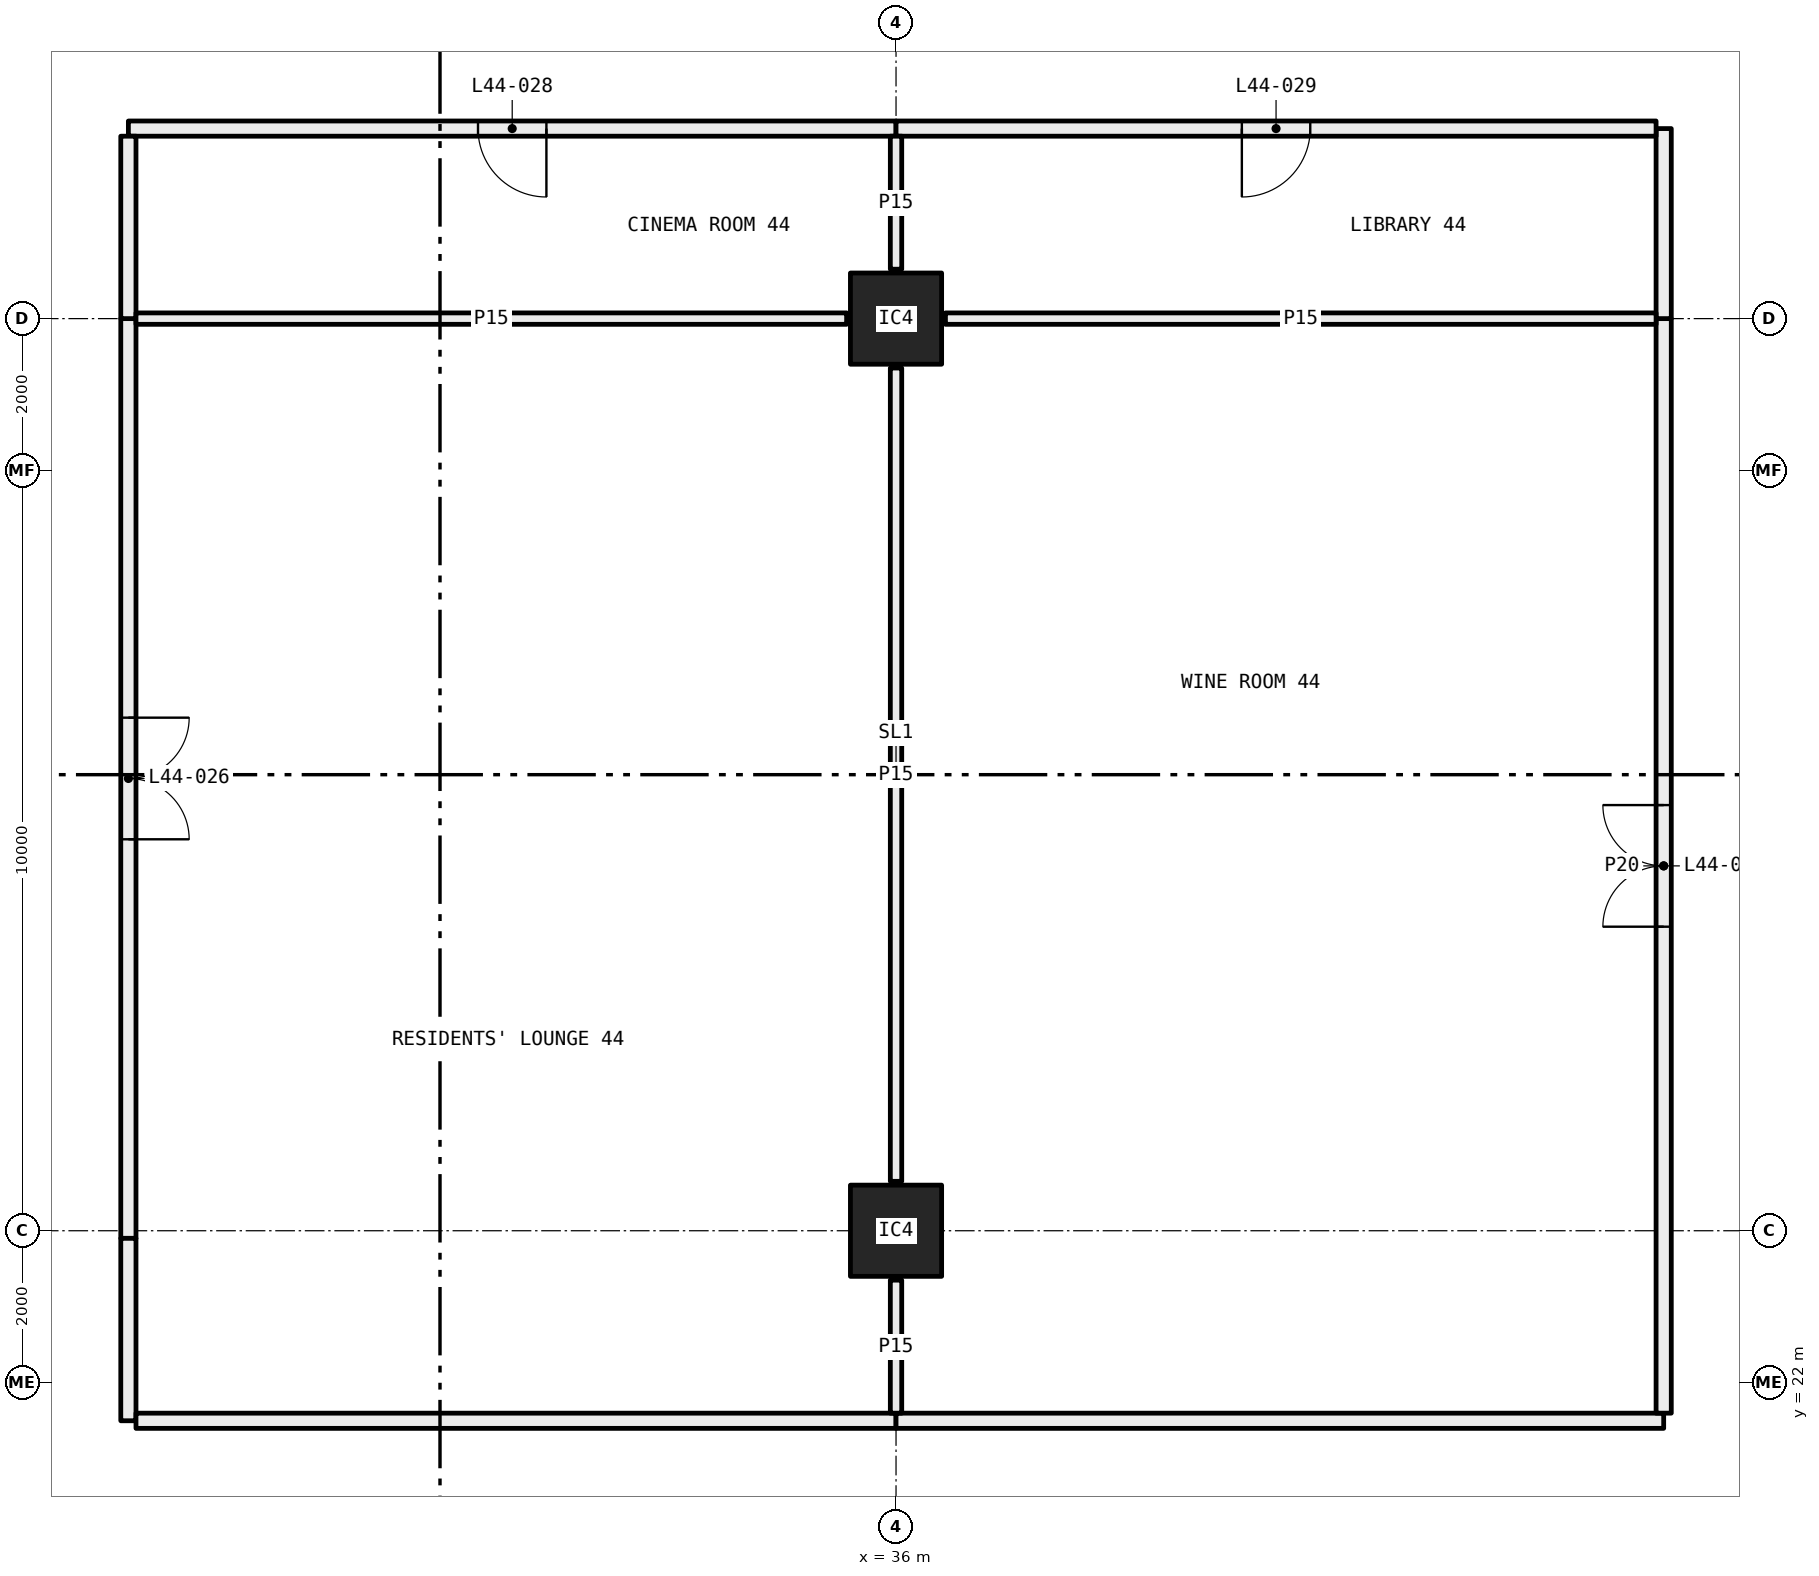
"""IFC4 building model, lengths in metres.
Left out: names, types, materials, properties, quantities, classifications, styles, units other than length and angle.
Written with IfcOpenShell. Run it as: python <this file> out.ifc"""

import sys

from ifc_helpers import new_model, si_unit, direction, frame, frame_2d, origin, origin_2d, place, context, subcontext, project, spatial, rectangle, hollow_rectangle, extrude, element, fill, save


model = new_model("IFC4")
c1 = context("Model", 3, precision=1e-05, world=origin(), true_north=direction((0.0, 1.0)))
c2 = subcontext(c1, "Body", "Model", "MODEL_VIEW")
j1 = project(units=[si_unit("LENGTHUNIT", "METRE"), si_unit("PLANEANGLEUNIT", "RADIAN")], contexts=[c1])
p1 = place(None, origin())
s1 = spatial("IfcSite", under=j1, at=p1, CompositionType="ELEMENT")
p2 = place(p1, origin())
s2 = spatial("IfcBuilding", under=s1, at=p2, CompositionType="ELEMENT")
p3 = place(p2, frame((0.0, 0.0, 168.6)))
s3 = spatial("IfcBuildingStorey", under=s2, at=p3, CompositionType="ELEMENT", Elevation=168.6)
for number, where, z_axis, x_axis in (
    (1, (36.0, 24.0, 0.0), (0.0, 0.0, 1.0), (1.0, 0.0, 0.0)),
    (2, (36.0, 36.0, 0.0), (0.0, 0.0, 1.0), (1.0, 0.0, 0.0)),
):
    element("IfcColumn", number, at=place(p3, frame(where, z_axis=z_axis, x_axis=x_axis)), inside=s3, PredefinedType="COLUMN", context=c2, shape_type="SweptSolid", body=[
        extrude(hollow_rectangle(XDim=1.2, YDim=1.2, WallThickness=0.05, at=origin_2d()), origin(), (0.0, 0.0, 1.0), 3.05),
    ])
p4 = place(p3, frame((25.9, 36.0, 0.0), z_axis=(0.0, 0.0, 1.0), x_axis=(0.0, -1.0, 0.0)))
e3 = element("IfcWall", 3, at=p4, inside=s3, PredefinedType="PARTITIONING", context=c2, shape_type="SweptSolid", body=[
    extrude(rectangle(XDim=12.1, YDim=0.2, at=frame_2d((6.05, 0.0))), origin(), (0.0, 0.0, 1.0), 2.45),
])
p5 = place(p4, frame((5.25, 0.0, 0.0)))
e4 = element("IfcOpeningElement", 4, at=p5, cuts=e3, PredefinedType="OPENING", context=c2, shape_type="SweptSolid", body=[
    extrude(rectangle(XDim=1.6, YDim=2.1, at=frame_2d((0.8, 1.05))), frame((0.0, 0.11, 0.0), z_axis=(0.0, -1.0, 0.0), x_axis=(1.0, 0.0, 0.0)), (0.0, 0.0, 1.0), 0.22),
])
p6 = place(p3, frame((25.9, 23.9, 0.0), z_axis=(0.0, 0.0, 1.0), x_axis=(0.0, -1.0, 0.0)))
e5 = element("IfcWall", 5, at=p6, inside=s3, PredefinedType="PARTITIONING", context=c2, shape_type="SweptSolid", body=[
    extrude(rectangle(XDim=2.4, YDim=0.2, at=frame_2d((1.2, 0.0))), origin(), (0.0, 0.0, 1.0), 3.05),
])
p7 = place(p3, frame((26.0, 21.5, 0.0), z_axis=(0.0, 0.0, 1.0), x_axis=(1.0, 0.0, 0.0)))
e6 = element("IfcWall", 6, at=p7, inside=s3, PredefinedType="PARTITIONING", context=c2, shape_type="SweptSolid", body=[
    extrude(rectangle(XDim=10.0, YDim=0.2, at=frame_2d((5.0, 0.0))), origin(), (0.0, 0.0, 1.0), 2.45),
])
p8 = place(p3, frame((36.0, 21.5, 0.0), z_axis=(0.0, 0.0, 1.0), x_axis=(1.0, 0.0, 0.0)))
e7 = element("IfcWall", 7, at=p8, inside=s3, PredefinedType="PARTITIONING", context=c2, shape_type="SweptSolid", body=[
    extrude(rectangle(XDim=10.1, YDim=0.2, at=frame_2d((5.05, 0.0))), origin(), (0.0, 0.0, 1.0), 2.45),
])
p9 = place(p3, frame((46.1, 21.6, 0.0), z_axis=(0.0, 0.0, 1.0), x_axis=(0.0, 1.0, 0.0)))
e8 = element("IfcWall", 8, at=p9, inside=s3, PredefinedType="PARTITIONING", context=c2, shape_type="SweptSolid", body=[
    extrude(rectangle(XDim=14.4, YDim=0.2, at=frame_2d((7.2, 0.0))), origin(), (0.0, 0.0, 1.0), 2.45),
])
p10 = place(p9, frame((6.4, 0.0, 0.0)))
e9 = element("IfcOpeningElement", 9, at=p10, cuts=e8, PredefinedType="OPENING", context=c2, shape_type="SweptSolid", body=[
    extrude(rectangle(XDim=1.6, YDim=2.1, at=frame_2d((0.8, 1.05))), frame((0.0, 0.11, 0.0), z_axis=(0.0, -1.0, 0.0), x_axis=(1.0, 0.0, 0.0)), (0.0, 0.0, 1.0), 0.22),
])
p11 = place(p3, frame((36.0, 38.5, 0.0), z_axis=(0.0, 0.0, 1.0), x_axis=(-1.0, 0.0, 0.0)))
e10 = element("IfcWall", 10, at=p11, inside=s3, PredefinedType="PARTITIONING", context=c2, shape_type="SweptSolid", body=[
    extrude(rectangle(XDim=10.1, YDim=0.2, at=frame_2d((5.05, 0.0))), origin(), (0.0, 0.0, 1.0), 2.45),
])
p12 = place(p11, frame((4.6, 0.0, 0.0)))
e11 = element("IfcOpeningElement", 11, at=p12, cuts=e10, PredefinedType="OPENING", context=c2, shape_type="SweptSolid", body=[
    extrude(rectangle(XDim=0.9, YDim=2.1, at=frame_2d((0.45, 1.05))), frame((0.0, 0.11, 0.0), z_axis=(0.0, -1.0, 0.0), x_axis=(1.0, 0.0, 0.0)), (0.0, 0.0, 1.0), 0.22),
])
p13 = place(p3, frame((25.9, 38.4, 0.0), z_axis=(0.0, 0.0, 1.0), x_axis=(0.0, -1.0, 0.0)))
e12 = element("IfcWall", 12, at=p13, inside=s3, PredefinedType="PARTITIONING", context=c2, shape_type="SweptSolid", body=[
    extrude(rectangle(XDim=2.4, YDim=0.2, at=frame_2d((1.2, 0.0))), origin(), (0.0, 0.0, 1.0), 2.45),
])
p14 = place(p3, frame((46.1, 36.0, 0.0), z_axis=(0.0, 0.0, 1.0), x_axis=(0.0, 1.0, 0.0)))
e13 = element("IfcWall", 13, at=p14, inside=s3, PredefinedType="PARTITIONING", context=c2, shape_type="SweptSolid", body=[
    extrude(rectangle(XDim=2.5, YDim=0.2, at=frame_2d((1.25, 0.0))), origin(), (0.0, 0.0, 1.0), 2.45),
])
p15 = place(p3, frame((46.0, 38.5, 0.0), z_axis=(0.0, 0.0, 1.0), x_axis=(-1.0, 0.0, 0.0)))
e14 = element("IfcWall", 14, at=p15, inside=s3, PredefinedType="PARTITIONING", context=c2, shape_type="SweptSolid", body=[
    extrude(rectangle(XDim=10.0, YDim=0.2, at=frame_2d((5.0, 0.0))), origin(), (0.0, 0.0, 1.0), 2.45),
])
p16 = place(p15, frame((4.55, 0.0, 0.0)))
e15 = element("IfcOpeningElement", 15, at=p16, cuts=e14, PredefinedType="OPENING", context=c2, shape_type="SweptSolid", body=[
    extrude(rectangle(XDim=0.9, YDim=2.1, at=frame_2d((0.45, 1.05))), frame((0.0, 0.11, 0.0), z_axis=(0.0, -1.0, 0.0), x_axis=(1.0, 0.0, 0.0)), (0.0, 0.0, 1.0), 0.22),
])
p17 = place(p3, frame((36.0, 21.6, 0.0), z_axis=(0.0, 0.0, 1.0), x_axis=(0.0, 1.0, 0.0)))
e16 = element("IfcWall", 16, at=p17, inside=s3, PredefinedType="PARTITIONING", context=c2, shape_type="SweptSolid", body=[
    extrude(rectangle(XDim=1.75, YDim=0.15, at=frame_2d((0.875, 0.0))), origin(), (0.0, 0.0, 1.0), 2.45),
])
p18 = place(p3, frame((36.0, 24.65, 0.0), z_axis=(0.0, 0.0, 1.0), x_axis=(0.0, 1.0, 0.0)))
e17 = element("IfcWall", 17, at=p18, inside=s3, PredefinedType="PARTITIONING", context=c2, shape_type="SweptSolid", body=[
    extrude(rectangle(XDim=10.7, YDim=0.15, at=frame_2d((5.35, 0.0))), origin(), (0.0, 0.0, 1.0), 2.45),
])
for number, where, z_axis, x_axis in (
    (18, (35.35, 36.0, 0.0), (0.0, 0.0, 1.0), (-1.0, 0.0, 0.0)),
    (19, (46.0, 36.0, 0.0), (0.0, 0.0, 1.0), (-1.0, 0.0, 0.0)),
):
    element("IfcWall", number, at=place(p3, frame(where, z_axis=z_axis, x_axis=x_axis)), inside=s3, PredefinedType="PARTITIONING", context=c2, shape_type="SweptSolid", body=[
        extrude(rectangle(XDim=9.35, YDim=0.15, at=frame_2d((4.675, 0.0))), origin(), (0.0, 0.0, 1.0), 2.45),
    ])
p19 = place(p3, frame((36.0, 36.65, 0.0), z_axis=(0.0, 0.0, 1.0), x_axis=(0.0, 1.0, 0.0)))
e20 = element("IfcWall", 20, at=p19, inside=s3, PredefinedType="PARTITIONING", context=c2, shape_type="SweptSolid", body=[
    extrude(rectangle(XDim=1.75, YDim=0.15, at=frame_2d((0.875, 0.0))), origin(), (0.0, 0.0, 1.0), 2.45),
])
p20 = place(p5, origin())
e21 = element("IfcDoor", 21, at=p20, inside=s3, OperationType="DOUBLE_DOOR_SINGLE_SWING", PredefinedType="DOOR", context=c2, shape_type="SweptSolid", body=[
    extrude(rectangle(XDim=1.6, YDim=2.1, at=frame_2d((0.8, 1.05))), frame((0.0, 0.025, 0.0), z_axis=(0.0, -1.0, 0.0), x_axis=(1.0, 0.0, 0.0)), (0.0, 0.0, 1.0), 0.05),
])
fill(e4, e21)
p21 = place(p10, origin())
e22 = element("IfcDoor", 22, at=p21, inside=s3, OperationType="DOUBLE_DOOR_SINGLE_SWING", PredefinedType="DOOR", context=c2, shape_type="SweptSolid", body=[
    extrude(rectangle(XDim=1.6, YDim=2.1, at=frame_2d((0.8, 1.05))), frame((0.0, 0.025, 0.0), z_axis=(0.0, -1.0, 0.0), x_axis=(1.0, 0.0, 0.0)), (0.0, 0.0, 1.0), 0.05),
])
fill(e9, e22)
p22 = place(p12, origin())
e23 = element("IfcDoor", 23, at=p22, inside=s3, OperationType="SINGLE_SWING_RIGHT", PredefinedType="DOOR", context=c2, shape_type="SweptSolid", body=[
    extrude(rectangle(XDim=0.9, YDim=2.1, at=frame_2d((0.45, 1.05))), frame((0.0, 0.025, 0.0), z_axis=(0.0, -1.0, 0.0), x_axis=(1.0, 0.0, 0.0)), (0.0, 0.0, 1.0), 0.05),
])
fill(e11, e23)
p23 = place(p16, origin())
e24 = element("IfcDoor", 24, at=p23, inside=s3, OperationType="SINGLE_SWING_LEFT", PredefinedType="DOOR", context=c2, shape_type="SweptSolid", body=[
    extrude(rectangle(XDim=0.9, YDim=2.1, at=frame_2d((0.45, 1.05))), frame((0.0, 0.025, 0.0), z_axis=(0.0, -1.0, 0.0), x_axis=(1.0, 0.0, 0.0)), (0.0, 0.0, 1.0), 0.05),
])
fill(e15, e24)
save(model, sys.argv[1])
